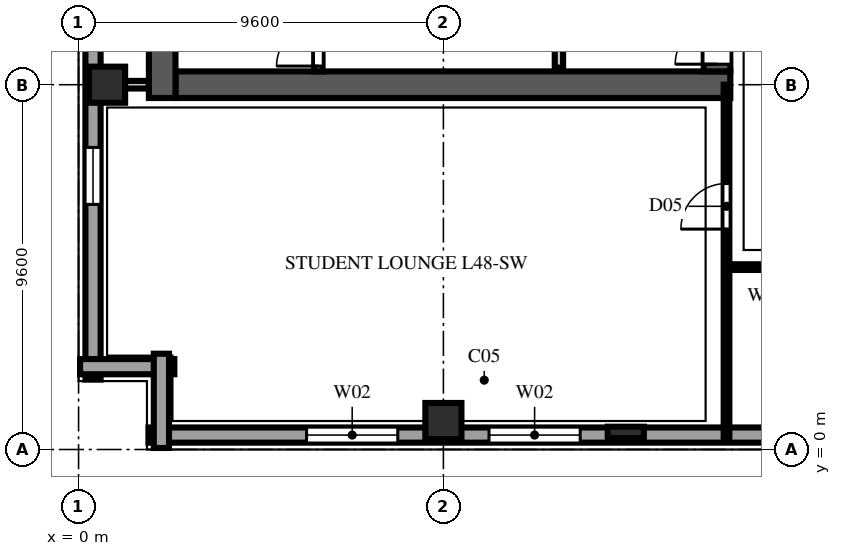
"""IFC4 building model, lengths in metres.
Left out: names, types, materials, properties, quantities, classifications, styles, units other than length and angle.
Written with IfcOpenShell. Run it as: python <this file> out.ifc"""

import sys

from ifc_helpers import new_model, si_unit, direction, frame, frame_2d, origin, origin_2d, place, context, subcontext, project, spatial, rectangle, extrude, element, fill, save


model = new_model("IFC4")
c1 = context("Model", 3, precision=1e-05, world=origin(), true_north=direction((0.0, 1.0)))
c2 = subcontext(c1, "Body", "Model", "MODEL_VIEW")
j1 = project(units=[si_unit("LENGTHUNIT", "METRE"), si_unit("PLANEANGLEUNIT", "RADIAN")], contexts=[c1])
p1 = place(None, origin())
s1 = spatial("IfcSite", under=j1, at=p1, CompositionType="ELEMENT")
p2 = place(p1, origin())
s2 = spatial("IfcBuilding", under=s1, at=p2, CompositionType="ELEMENT")
p3 = place(p2, frame((0.0, 0.0, 190.2)))
s3 = spatial("IfcBuildingStorey", under=s2, at=p3, CompositionType="ELEMENT", Elevation=190.2)
p4 = place(p3, frame((2.55, 9.6, 0.0), z_axis=(0.0, 0.0, 1.0), x_axis=(1.0, 0.0, 0.0)))
e1 = element("IfcWall", 1, at=p4, inside=s3, PredefinedType="SHEAR", context=c2, shape_type="SweptSolid", body=[
    extrude(rectangle(XDim=14.6, YDim=0.7, at=frame_2d((7.3, 0.0))), origin(), (0.0, 0.0, 1.0), 3.48),
])
p5 = place(p3, frame((2.2, 9.25, 0.0), z_axis=(0.0, 0.0, 1.0), x_axis=(0.0, 1.0, 0.0)))
e2 = element("IfcWall", 2, at=p5, inside=s3, PredefinedType="SHEAR", context=c2, shape_type="SweptSolid", body=[
    extrude(rectangle(XDim=39.1, YDim=0.7, at=frame_2d((19.55, 0.0))), origin(), (0.0, 0.0, 1.0), 3.48),
])
p6 = place(p3, frame((16.8, 9.95, 0.0), z_axis=(0.0, 0.0, 1.0), x_axis=(0.0, 1.0, 0.0)))
e3 = element("IfcWall", 3, at=p6, inside=s3, PredefinedType="SHEAR", context=c2, shape_type="SweptSolid", body=[
    extrude(rectangle(XDim=12.45, YDim=0.7, at=frame_2d((6.225, 0.0))), origin(), (0.0, 0.0, 1.0), 3.48),
])
p7 = place(p6, frame((0.19, 0.0, 0.0)))
e4 = element("IfcOpeningElement", 4, at=p7, cuts=e3, PredefinedType="OPENING", context=c2, shape_type="SweptSolid", body=[
    extrude(rectangle(XDim=1.1, YDim=2.2, at=frame_2d((0.55, 1.1))), frame((0.0, 0.362, 0.0), z_axis=(0.0, -1.0, 0.0), x_axis=(1.0, 0.0, 0.0)), (0.0, 0.0, 1.0), 0.724),
])
for number, where, z_axis, x_axis in (
    (5, (0.75, 9.6, 0.0), (0.0, 0.0, 1.0), (1.0, 0.0, 0.0)),
    (6, (9.6, 0.75, 0.0), (0.0, 0.0, 1.0), (1.0, 0.0, 0.0)),
):
    element("IfcColumn", number, at=place(p3, frame(where, z_axis=z_axis, x_axis=x_axis)), inside=s3, PredefinedType="COLUMN", context=c2, shape_type="SweptSolid", body=[
        extrude(rectangle(XDim=0.95, YDim=0.95, at=origin_2d()), origin(), (0.0, 0.0, 1.0), 3.8),
    ])
p8 = place(p3, frame((14.4, 0.45, 0.0), z_axis=(0.0, 0.0, 1.0), x_axis=(1.0, 0.0, 0.0)))
e7 = element("IfcColumn", 7, at=p8, inside=s3, PredefinedType="PILASTER", context=c2, shape_type="SweptSolid", body=[
    extrude(rectangle(XDim=0.95, YDim=0.3, at=origin_2d()), origin(), (0.0, 0.0, 1.0), 3.8),
])
p9 = place(p3, frame((1.84, 0.38, 0.0), z_axis=(0.0, 0.0, 1.0), x_axis=(1.0, 0.0, 0.0)))
e8 = element("IfcWall", 8, at=p9, inside=s3, PredefinedType="SOLIDWALL", context=c2, shape_type="SweptSolid", body=[
    extrude(rectangle(XDim=53.92, YDim=0.4, at=frame_2d((26.96, 0.0))), origin(), (0.0, 0.0, 1.0), 3.48),
])
p10 = place(p9, frame((4.16, 0.0, 0.85)))
e9 = element("IfcOpeningElement", 9, at=p10, cuts=e8, PredefinedType="OPENING", context=c2, shape_type="SweptSolid", body=[
    extrude(rectangle(XDim=2.4, YDim=1.85, at=frame_2d((1.2, 0.925))), frame((0.0, 0.212, 0.0), z_axis=(0.0, -1.0, 0.0), x_axis=(1.0, 0.0, 0.0)), (0.0, 0.0, 1.0), 0.424),
])
p11 = place(p9, frame((8.96, 0.0, 0.85)))
e10 = element("IfcOpeningElement", 10, at=p11, cuts=e8, PredefinedType="OPENING", context=c2, shape_type="SweptSolid", body=[
    extrude(rectangle(XDim=2.4, YDim=1.85, at=frame_2d((1.2, 0.925))), frame((0.0, 0.212, 0.0), z_axis=(0.0, -1.0, 0.0), x_axis=(1.0, 0.0, 0.0)), (0.0, 0.0, 1.0), 0.424),
])
p12 = place(p9, frame((18.56, 0.0, 0.85)))
e11 = element("IfcOpeningElement", 11, at=p12, cuts=e8, PredefinedType="OPENING", context=c2, shape_type="SweptSolid", body=[
    extrude(rectangle(XDim=2.4, YDim=1.85, at=frame_2d((1.2, 0.925))), frame((0.0, 0.212, 0.0), z_axis=(0.0, -1.0, 0.0), x_axis=(1.0, 0.0, 0.0)), (0.0, 0.0, 1.0), 0.424),
])
p13 = place(p9, frame((28.16, 0.0, 0.85)))
e12 = element("IfcOpeningElement", 12, at=p13, cuts=e8, PredefinedType="OPENING", context=c2, shape_type="SweptSolid", body=[
    extrude(rectangle(XDim=2.4, YDim=1.85, at=frame_2d((1.2, 0.925))), frame((0.0, 0.212, 0.0), z_axis=(0.0, -1.0, 0.0), x_axis=(1.0, 0.0, 0.0)), (0.0, 0.0, 1.0), 0.424),
])
p14 = place(p3, frame((0.38, 65.36, 0.0), z_axis=(0.0, 0.0, 1.0), x_axis=(0.0, -1.0, 0.0)))
e13 = element("IfcWall", 13, at=p14, inside=s3, PredefinedType="SOLIDWALL", context=c2, shape_type="SweptSolid", body=[
    extrude(rectangle(XDim=63.52, YDim=0.4, at=frame_2d((31.76, 0.0))), origin(), (0.0, 0.0, 1.0), 3.48),
])
p15 = place(p14, frame((4.885, 0.0, 0.85)))
e14 = element("IfcOpeningElement", 14, at=p15, cuts=e13, PredefinedType="OPENING", context=c2, shape_type="SweptSolid", body=[
    extrude(rectangle(XDim=0.95, YDim=1.85, at=frame_2d((0.475, 0.925))), frame((0.0, 0.212, 0.0), z_axis=(0.0, -1.0, 0.0), x_axis=(1.0, 0.0, 0.0)), (0.0, 0.0, 1.0), 0.424),
])
p16 = place(p14, frame((9.41, 0.0, 0.85)))
e15 = element("IfcOpeningElement", 15, at=p16, cuts=e13, PredefinedType="OPENING", context=c2, shape_type="SweptSolid", body=[
    extrude(rectangle(XDim=1.5, YDim=1.85, at=frame_2d((0.75, 0.925))), frame((0.0, 0.212, 0.0), z_axis=(0.0, -1.0, 0.0), x_axis=(1.0, 0.0, 0.0)), (0.0, 0.0, 1.0), 0.424),
])
p17 = place(p14, frame((14.485, 0.0, 0.85)))
e16 = element("IfcOpeningElement", 16, at=p17, cuts=e13, PredefinedType="OPENING", context=c2, shape_type="SweptSolid", body=[
    extrude(rectangle(XDim=0.95, YDim=1.85, at=frame_2d((0.475, 0.925))), frame((0.0, 0.212, 0.0), z_axis=(0.0, -1.0, 0.0), x_axis=(1.0, 0.0, 0.0)), (0.0, 0.0, 1.0), 0.424),
])
p18 = place(p14, frame((19.01, 0.0, 0.85)))
e17 = element("IfcOpeningElement", 17, at=p18, cuts=e13, PredefinedType="OPENING", context=c2, shape_type="SweptSolid", body=[
    extrude(rectangle(XDim=1.5, YDim=1.85, at=frame_2d((0.75, 0.925))), frame((0.0, 0.212, 0.0), z_axis=(0.0, -1.0, 0.0), x_axis=(1.0, 0.0, 0.0)), (0.0, 0.0, 1.0), 0.424),
])
p19 = place(p14, frame((24.085, 0.0, 0.85)))
e18 = element("IfcOpeningElement", 18, at=p19, cuts=e13, PredefinedType="OPENING", context=c2, shape_type="SweptSolid", body=[
    extrude(rectangle(XDim=0.95, YDim=1.85, at=frame_2d((0.475, 0.925))), frame((0.0, 0.212, 0.0), z_axis=(0.0, -1.0, 0.0), x_axis=(1.0, 0.0, 0.0)), (0.0, 0.0, 1.0), 0.424),
])
p20 = place(p14, frame((28.61, 0.0, 0.85)))
e19 = element("IfcOpeningElement", 19, at=p20, cuts=e13, PredefinedType="OPENING", context=c2, shape_type="SweptSolid", body=[
    extrude(rectangle(XDim=1.5, YDim=1.85, at=frame_2d((0.75, 0.925))), frame((0.0, 0.212, 0.0), z_axis=(0.0, -1.0, 0.0), x_axis=(1.0, 0.0, 0.0)), (0.0, 0.0, 1.0), 0.424),
])
p21 = place(p14, frame((33.685, 0.0, 0.85)))
e20 = element("IfcOpeningElement", 20, at=p21, cuts=e13, PredefinedType="OPENING", context=c2, shape_type="SweptSolid", body=[
    extrude(rectangle(XDim=0.95, YDim=1.85, at=frame_2d((0.475, 0.925))), frame((0.0, 0.212, 0.0), z_axis=(0.0, -1.0, 0.0), x_axis=(1.0, 0.0, 0.0)), (0.0, 0.0, 1.0), 0.424),
])
p22 = place(p14, frame((38.21, 0.0, 0.85)))
e21 = element("IfcOpeningElement", 21, at=p22, cuts=e13, PredefinedType="OPENING", context=c2, shape_type="SweptSolid", body=[
    extrude(rectangle(XDim=1.5, YDim=1.85, at=frame_2d((0.75, 0.925))), frame((0.0, 0.212, 0.0), z_axis=(0.0, -1.0, 0.0), x_axis=(1.0, 0.0, 0.0)), (0.0, 0.0, 1.0), 0.424),
])
p23 = place(p14, frame((43.285, 0.0, 0.85)))
e22 = element("IfcOpeningElement", 22, at=p23, cuts=e13, PredefinedType="OPENING", context=c2, shape_type="SweptSolid", body=[
    extrude(rectangle(XDim=0.95, YDim=1.85, at=frame_2d((0.475, 0.925))), frame((0.0, 0.212, 0.0), z_axis=(0.0, -1.0, 0.0), x_axis=(1.0, 0.0, 0.0)), (0.0, 0.0, 1.0), 0.424),
])
p24 = place(p14, frame((47.81, 0.0, 0.85)))
e23 = element("IfcOpeningElement", 23, at=p24, cuts=e13, PredefinedType="OPENING", context=c2, shape_type="SweptSolid", body=[
    extrude(rectangle(XDim=1.5, YDim=1.85, at=frame_2d((0.75, 0.925))), frame((0.0, 0.212, 0.0), z_axis=(0.0, -1.0, 0.0), x_axis=(1.0, 0.0, 0.0)), (0.0, 0.0, 1.0), 0.424),
])
p25 = place(p14, frame((52.885, 0.0, 0.85)))
e24 = element("IfcOpeningElement", 24, at=p25, cuts=e13, PredefinedType="OPENING", context=c2, shape_type="SweptSolid", body=[
    extrude(rectangle(XDim=0.95, YDim=1.85, at=frame_2d((0.475, 0.925))), frame((0.0, 0.212, 0.0), z_axis=(0.0, -1.0, 0.0), x_axis=(1.0, 0.0, 0.0)), (0.0, 0.0, 1.0), 0.424),
])
p26 = place(p14, frame((57.41, 0.0, 0.85)))
e25 = element("IfcOpeningElement", 25, at=p26, cuts=e13, PredefinedType="OPENING", context=c2, shape_type="SweptSolid", body=[
    extrude(rectangle(XDim=1.5, YDim=1.85, at=frame_2d((0.75, 0.925))), frame((0.0, 0.212, 0.0), z_axis=(0.0, -1.0, 0.0), x_axis=(1.0, 0.0, 0.0)), (0.0, 0.0, 1.0), 0.424),
])
for number, where, z_axis, x_axis in (
    (26, (0.04, 2.18, 0.0), (0.0, 0.0, 1.0), (1.0, 0.0, 0.0)),
    (27, (2.18, 2.52, 0.0), (0.0, 0.0, 1.0), (0.0, -1.0, 0.0)),
):
    element("IfcWall", number, at=place(p3, frame(where, z_axis=z_axis, x_axis=x_axis)), inside=s3, PredefinedType="SOLIDWALL", context=c2, shape_type="SweptSolid", body=[
        extrude(rectangle(XDim=2.48, YDim=0.4, at=frame_2d((1.24, 0.0))), origin(), (0.0, 0.0, 1.0), 3.48),
    ])
p27 = place(p3, frame((6.31, 9.95, 0.0), z_axis=(0.0, 0.0, 1.0), x_axis=(0.0, 1.0, 0.0)))
e28 = element("IfcWall", 28, at=p27, inside=s3, PredefinedType="SOLIDWALL", context=c2, shape_type="SweptSolid", body=[
    extrude(rectangle(XDim=7.81, YDim=0.22, at=frame_2d((3.905, 0.0))), origin(), (0.0, 0.0, 1.0), 3.48),
])
p28 = place(p27, frame((0.14, 0.0, 0.0)))
e29 = element("IfcOpeningElement", 29, at=p28, cuts=e28, PredefinedType="OPENING", context=c2, shape_type="SweptSolid", body=[
    extrude(rectangle(XDim=1.1, YDim=2.2, at=frame_2d((0.55, 1.1))), frame((0.0, 0.122, 0.0), z_axis=(0.0, -1.0, 0.0), x_axis=(1.0, 0.0, 0.0)), (0.0, 0.0, 1.0), 0.244),
])
p29 = place(p3, frame((12.64, 10.05, 0.0), z_axis=(0.0, 0.0, 1.0), x_axis=(0.0, 1.0, 0.0)))
e30 = element("IfcWall", 30, at=p29, inside=s3, PredefinedType="SOLIDWALL", context=c2, shape_type="SweptSolid", body=[
    extrude(rectangle(XDim=7.71, YDim=0.22, at=frame_2d((3.855, 0.0))), origin(), (0.0, 0.0, 1.0), 3.48),
])
p30 = place(p3, frame((0.85, 9.6, 0.0), z_axis=(0.0, 0.0, 1.0), x_axis=(1.0, 0.0, 0.0)))
e31 = element("IfcWall", 31, at=p30, inside=s3, PredefinedType="SOLIDWALL", context=c2, shape_type="SweptSolid", body=[
    extrude(rectangle(XDim=0.995, YDim=0.2, at=frame_2d((0.498, 0.0))), origin(), (0.0, 0.0, 1.0), 2.863),
])
p31 = place(p3, frame((17.05, 4.8, 0.0), z_axis=(0.0, 0.0, 1.0), x_axis=(1.0, 0.0, 0.0)))
e32 = element("IfcWall", 32, at=p31, inside=s3, PredefinedType="PARTITIONING", context=c2, shape_type="SweptSolid", body=[
    extrude(rectangle(XDim=2.15, YDim=0.15, at=frame_2d((1.075, 0.0))), origin(), (0.0, 0.0, 1.0), 3.48),
])
p32 = place(p3, frame((17.05, 0.22, 0.0), z_axis=(0.0, 0.0, 1.0), x_axis=(0.0, 1.0, 0.0)))
e33 = element("IfcWall", 33, at=p32, inside=s3, PredefinedType="PARTITIONING", context=c2, shape_type="SweptSolid", body=[
    extrude(rectangle(XDim=9.38, YDim=0.15, at=frame_2d((4.69, 0.0))), origin(), (0.0, 0.0, 1.0), 3.48),
])
p33 = place(p32, frame((5.58, 0.0, 0.0)))
e34 = element("IfcOpeningElement", 34, at=p33, cuts=e33, PredefinedType="OPENING", context=c2, shape_type="SweptSolid", body=[
    extrude(rectangle(XDim=1.2, YDim=2.2, at=frame_2d((0.6, 1.1))), frame((0.0, 0.087, 0.0), z_axis=(0.0, -1.0, 0.0), x_axis=(1.0, 0.0, 0.0)), (0.0, 0.0, 1.0), 0.174),
])
p34 = place(p10, origin())
e35 = element("IfcWindow", 35, at=p34, inside=s3, PartitioningType="TRIPLE_PANEL_VERTICAL", PredefinedType="WINDOW", context=c2, shape_type="SweptSolid", body=[
    extrude(rectangle(XDim=2.4, YDim=1.85, at=frame_2d((1.2, 0.925))), frame((0.0, 0.11, 0.0), z_axis=(0.0, -1.0, 0.0), x_axis=(1.0, 0.0, 0.0)), (0.0, 0.0, 1.0), 0.06),
])
fill(e9, e35)
p35 = place(p11, origin())
e36 = element("IfcWindow", 36, at=p35, inside=s3, PartitioningType="TRIPLE_PANEL_VERTICAL", PredefinedType="WINDOW", context=c2, shape_type="SweptSolid", body=[
    extrude(rectangle(XDim=2.4, YDim=1.85, at=frame_2d((1.2, 0.925))), frame((0.0, 0.11, 0.0), z_axis=(0.0, -1.0, 0.0), x_axis=(1.0, 0.0, 0.0)), (0.0, 0.0, 1.0), 0.06),
])
fill(e10, e36)
p36 = place(p26, origin())
e37 = element("IfcWindow", 37, at=p36, inside=s3, PartitioningType="DOUBLE_PANEL_VERTICAL", PredefinedType="WINDOW", context=c2, shape_type="SweptSolid", body=[
    extrude(rectangle(XDim=1.5, YDim=1.85, at=frame_2d((0.75, 0.925))), frame((0.0, 0.11, 0.0), z_axis=(0.0, -1.0, 0.0), x_axis=(1.0, 0.0, 0.0)), (0.0, 0.0, 1.0), 0.06),
])
fill(e25, e37)
p37 = place(p28, origin())
e38 = element("IfcDoor", 38, at=p37, inside=s3, OperationType="SINGLE_SWING_LEFT", PredefinedType="DOOR", context=c2, shape_type="SweptSolid", body=[
    extrude(rectangle(XDim=1.1, YDim=2.2, at=frame_2d((0.55, 1.1))), frame((0.0, 0.025, 0.0), z_axis=(0.0, -1.0, 0.0), x_axis=(1.0, 0.0, 0.0)), (0.0, 0.0, 1.0), 0.05),
])
fill(e29, e38)
p38 = place(p7, origin())
e39 = element("IfcDoor", 39, at=p38, inside=s3, OperationType="SINGLE_SWING_LEFT", PredefinedType="DOOR", context=c2, shape_type="SweptSolid", body=[
    extrude(rectangle(XDim=1.1, YDim=2.2, at=frame_2d((0.55, 1.1))), frame((0.0, 0.025, 0.0), z_axis=(0.0, -1.0, 0.0), x_axis=(1.0, 0.0, 0.0)), (0.0, 0.0, 1.0), 0.05),
])
fill(e4, e39)
p39 = place(p33, origin())
e40 = element("IfcDoor", 40, at=p39, inside=s3, OperationType="SINGLE_SWING_LEFT", PredefinedType="DOOR", context=c2, shape_type="SweptSolid", body=[
    extrude(rectangle(XDim=1.2, YDim=2.2, at=frame_2d((0.6, 1.1))), frame((0.0, 0.025, 0.0), z_axis=(0.0, -1.0, 0.0), x_axis=(1.0, 0.0, 0.0)), (0.0, 0.0, 1.0), 0.05),
])
fill(e34, e40)
save(model, sys.argv[1])
